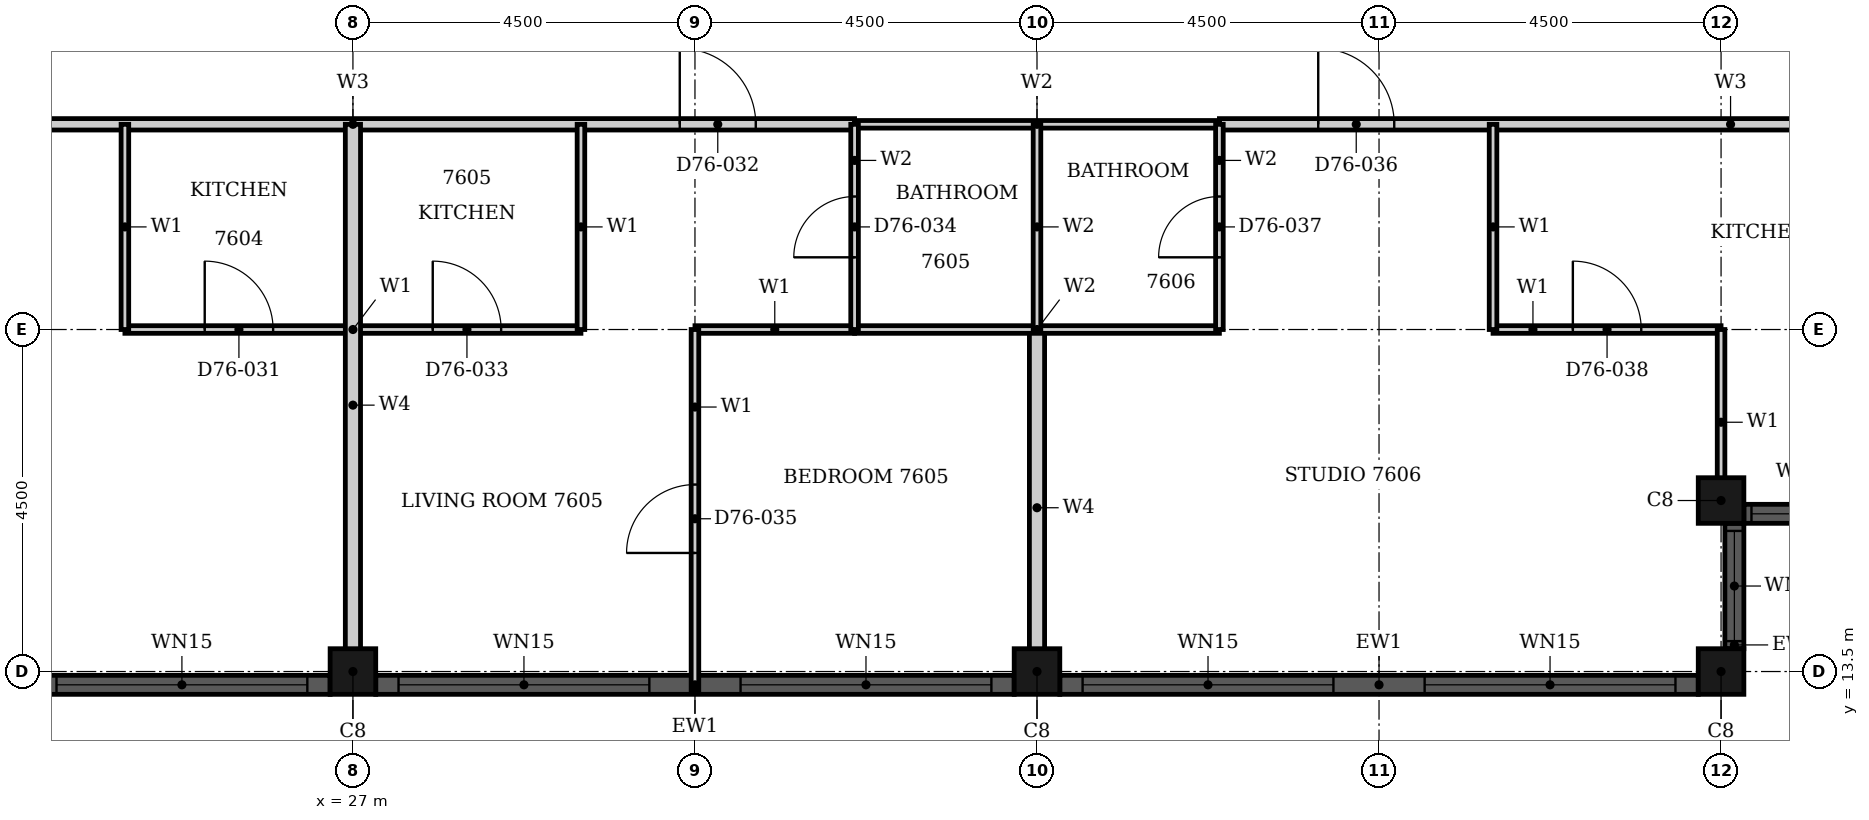
"""IFC4 building model, lengths in metres.
Left out: names, types, materials, properties, quantities, classifications, styles, units other than length and angle.
Written with IfcOpenShell. Run it as: python <this file> out.ifc"""

import sys

from ifc_helpers import new_model, si_unit, direction, frame, frame_2d, origin, origin_2d, place, context, subcontext, project, spatial, rectangle, hollow_rectangle, extrude, element, fill, save


model = new_model("IFC4")
c1 = context("Model", 3, precision=1e-05, world=origin(), true_north=direction((0.0, 1.0)))
c2 = subcontext(c1, "Body", "Model", "MODEL_VIEW")
j1 = project(units=[si_unit("LENGTHUNIT", "METRE"), si_unit("PLANEANGLEUNIT", "RADIAN")], contexts=[c1])
p1 = place(None, origin())
s1 = spatial("IfcSite", under=j1, at=p1, CompositionType="ELEMENT")
p2 = place(p1, origin())
s2 = spatial("IfcBuilding", under=s1, at=p2, CompositionType="ELEMENT")
p3 = place(p2, frame((0.0, 0.0, 298.2)))
s3 = spatial("IfcBuildingStorey", under=s2, at=p3, CompositionType="ELEMENT", Elevation=298.2)
for number, where, z_axis, x_axis in (
    (1, (45.0, 13.5, 0.0), (0.0, 0.0, 1.0), (1.0, 0.0, 0.0)),
    (2, (45.0, 15.75, 0.0), (0.0, 0.0, 1.0), (1.0, 0.0, 0.0)),
    (3, (27.0, 13.5, 0.0), (0.0, 0.0, 1.0), (1.0, 0.0, 0.0)),
    (4, (36.0, 13.5, 0.0), (0.0, 0.0, 1.0), (1.0, 0.0, 0.0)),
):
    element("IfcColumn", number, at=place(p3, frame(where, z_axis=z_axis, x_axis=x_axis)), inside=s3, PredefinedType="COLUMN", context=c2, shape_type="SweptSolid", body=[
        extrude(hollow_rectangle(XDim=0.6, YDim=0.6, WallThickness=0.02, at=origin_2d()), origin(), (0.0, 0.0, 1.0), 3.7),
    ])
p4 = place(p3, frame((45.175, 13.8, 0.0), z_axis=(0.0, 0.0, 1.0), x_axis=(0.0, 1.0, 0.0)))
e5 = element("IfcWall", 5, at=p4, inside=s3, PredefinedType="SOLIDWALL", context=c2, shape_type="SweptSolid", body=[
    extrude(rectangle(XDim=1.65, YDim=0.25, at=frame_2d((0.825, 0.0))), origin(), (0.0, 0.0, 1.0), 3.7),
])
p5 = place(p4, frame((0.1, 0.0, 0.9)))
e6 = element("IfcOpeningElement", 6, at=p5, cuts=e5, PredefinedType="OPENING", context=c2, shape_type="SweptSolid", body=[
    extrude(rectangle(XDim=1.45, YDim=1.85, at=frame_2d((0.725, 0.925))), frame((0.0, 0.135, 0.0), z_axis=(0.0, -1.0, 0.0), x_axis=(1.0, 0.0, 0.0)), (0.0, 0.0, 1.0), 0.27),
])
p6 = place(p3, frame((45.3, 15.575, 0.0), z_axis=(0.0, 0.0, 1.0), x_axis=(1.0, 0.0, 0.0)))
e7 = element("IfcWall", 7, at=p6, inside=s3, PredefinedType="SOLIDWALL", context=c2, shape_type="SweptSolid", body=[
    extrude(rectangle(XDim=1.65, YDim=0.25, at=frame_2d((0.825, 0.0))), origin(), (0.0, 0.0, 1.0), 3.7),
])
p7 = place(p6, frame((0.1, 0.0, 0.9)))
e8 = element("IfcOpeningElement", 8, at=p7, cuts=e7, PredefinedType="OPENING", context=c2, shape_type="SweptSolid", body=[
    extrude(rectangle(XDim=1.45, YDim=1.85, at=frame_2d((0.725, 0.925))), frame((0.0, 0.135, 0.0), z_axis=(0.0, -1.0, 0.0), x_axis=(1.0, 0.0, 0.0)), (0.0, 0.0, 1.0), 0.27),
])
p8 = place(p3, frame((18.3, 13.325, 0.0), z_axis=(0.0, 0.0, 1.0), x_axis=(1.0, 0.0, 0.0)))
e9 = element("IfcWall", 9, at=p8, inside=s3, PredefinedType="SOLIDWALL", context=c2, shape_type="SweptSolid", body=[
    extrude(rectangle(XDim=8.4, YDim=0.25, at=frame_2d((4.2, 0.0))), origin(), (0.0, 0.0, 1.0), 3.7),
])
p9 = place(p8, frame((0.3, 0.0, 0.45)))
e10 = element("IfcOpeningElement", 10, at=p9, cuts=e9, PredefinedType="OPENING", context=c2, shape_type="SweptSolid", body=[
    extrude(rectangle(XDim=3.3, YDim=2.3, at=frame_2d((1.65, 1.15))), frame((0.0, 0.135, 0.0), z_axis=(0.0, -1.0, 0.0), x_axis=(1.0, 0.0, 0.0)), (0.0, 0.0, 1.0), 0.27),
])
p10 = place(p8, frame((4.8, 0.0, 0.45)))
e11 = element("IfcOpeningElement", 11, at=p10, cuts=e9, PredefinedType="OPENING", context=c2, shape_type="SweptSolid", body=[
    extrude(rectangle(XDim=3.3, YDim=2.3, at=frame_2d((1.65, 1.15))), frame((0.0, 0.135, 0.0), z_axis=(0.0, -1.0, 0.0), x_axis=(1.0, 0.0, 0.0)), (0.0, 0.0, 1.0), 0.27),
])
p11 = place(p3, frame((27.3, 13.325, 0.0), z_axis=(0.0, 0.0, 1.0), x_axis=(1.0, 0.0, 0.0)))
e12 = element("IfcWall", 12, at=p11, inside=s3, PredefinedType="SOLIDWALL", context=c2, shape_type="SweptSolid", body=[
    extrude(rectangle(XDim=8.4, YDim=0.25, at=frame_2d((4.2, 0.0))), origin(), (0.0, 0.0, 1.0), 3.7),
])
p12 = place(p11, frame((0.3, 0.0, 0.45)))
e13 = element("IfcOpeningElement", 13, at=p12, cuts=e12, PredefinedType="OPENING", context=c2, shape_type="SweptSolid", body=[
    extrude(rectangle(XDim=3.3, YDim=2.3, at=frame_2d((1.65, 1.15))), frame((0.0, 0.135, 0.0), z_axis=(0.0, -1.0, 0.0), x_axis=(1.0, 0.0, 0.0)), (0.0, 0.0, 1.0), 0.27),
])
p13 = place(p11, frame((4.8, 0.0, 0.45)))
e14 = element("IfcOpeningElement", 14, at=p13, cuts=e12, PredefinedType="OPENING", context=c2, shape_type="SweptSolid", body=[
    extrude(rectangle(XDim=3.3, YDim=2.3, at=frame_2d((1.65, 1.15))), frame((0.0, 0.135, 0.0), z_axis=(0.0, -1.0, 0.0), x_axis=(1.0, 0.0, 0.0)), (0.0, 0.0, 1.0), 0.27),
])
p14 = place(p3, frame((36.3, 13.325, 0.0), z_axis=(0.0, 0.0, 1.0), x_axis=(1.0, 0.0, 0.0)))
e15 = element("IfcWall", 15, at=p14, inside=s3, PredefinedType="SOLIDWALL", context=c2, shape_type="SweptSolid", body=[
    extrude(rectangle(XDim=8.4, YDim=0.25, at=frame_2d((4.2, 0.0))), origin(), (0.0, 0.0, 1.0), 3.7),
])
p15 = place(p14, frame((0.3, 0.0, 0.45)))
e16 = element("IfcOpeningElement", 16, at=p15, cuts=e15, PredefinedType="OPENING", context=c2, shape_type="SweptSolid", body=[
    extrude(rectangle(XDim=3.3, YDim=2.3, at=frame_2d((1.65, 1.15))), frame((0.0, 0.135, 0.0), z_axis=(0.0, -1.0, 0.0), x_axis=(1.0, 0.0, 0.0)), (0.0, 0.0, 1.0), 0.27),
])
p16 = place(p14, frame((4.8, 0.0, 0.45)))
e17 = element("IfcOpeningElement", 17, at=p16, cuts=e15, PredefinedType="OPENING", context=c2, shape_type="SweptSolid", body=[
    extrude(rectangle(XDim=3.3, YDim=2.3, at=frame_2d((1.65, 1.15))), frame((0.0, 0.135, 0.0), z_axis=(0.0, -1.0, 0.0), x_axis=(1.0, 0.0, 0.0)), (0.0, 0.0, 1.0), 0.27),
])
p17 = place(p3, frame((20.4, 20.7, 0.0), z_axis=(0.0, 0.0, 1.0), x_axis=(1.0, 0.0, 0.0)))
e18 = element("IfcWall", 18, at=p17, inside=s3, PredefinedType="PARTITIONING", context=c2, shape_type="SweptSolid", body=[
    extrude(rectangle(XDim=13.2, YDim=0.15, at=frame_2d((6.6, 0.0))), origin(), (0.0, 0.0, 1.0), 3.4),
])
p18 = place(p17, frame((1.3, 0.0, 0.0)))
e19 = element("IfcOpeningElement", 19, at=p18, cuts=e18, PredefinedType="OPENING", context=c2, shape_type="SweptSolid", body=[
    extrude(rectangle(XDim=1.0, YDim=2.2, at=frame_2d((0.5, 1.1))), frame((0.0, 0.085, 0.0), z_axis=(0.0, -1.0, 0.0), x_axis=(1.0, 0.0, 0.0)), (0.0, 0.0, 1.0), 0.17),
])
p19 = place(p17, frame((10.9, 0.0, 0.0)))
e20 = element("IfcOpeningElement", 20, at=p19, cuts=e18, PredefinedType="OPENING", context=c2, shape_type="SweptSolid", body=[
    extrude(rectangle(XDim=1.0, YDim=2.2, at=frame_2d((0.5, 1.1))), frame((0.0, 0.085, 0.0), z_axis=(0.0, -1.0, 0.0), x_axis=(1.0, 0.0, 0.0)), (0.0, 0.0, 1.0), 0.17),
])
p20 = place(p3, frame((38.4, 20.7, 0.0), z_axis=(0.0, 0.0, 1.0), x_axis=(1.0, 0.0, 0.0)))
e21 = element("IfcWall", 21, at=p20, inside=s3, PredefinedType="PARTITIONING", context=c2, shape_type="SweptSolid", body=[
    extrude(rectangle(XDim=11.15, YDim=0.15, at=frame_2d((5.575, 0.0))), origin(), (0.0, 0.0, 1.0), 3.4),
])
p21 = place(p20, frame((1.3, 0.0, 0.0)))
e22 = element("IfcOpeningElement", 22, at=p21, cuts=e21, PredefinedType="OPENING", context=c2, shape_type="SweptSolid", body=[
    extrude(rectangle(XDim=1.0, YDim=2.2, at=frame_2d((0.5, 1.1))), frame((0.0, 0.085, 0.0), z_axis=(0.0, -1.0, 0.0), x_axis=(1.0, 0.0, 0.0)), (0.0, 0.0, 1.0), 0.17),
])
p22 = place(p3, frame((24.0, 18.0, 0.0), z_axis=(0.0, 0.0, 1.0), x_axis=(1.0, 0.0, 0.0)))
e23 = element("IfcWall", 23, at=p22, inside=s3, PredefinedType="PARTITIONING", context=c2, shape_type="SweptSolid", body=[
    extrude(rectangle(XDim=6.0, YDim=0.1, at=frame_2d((3.0, 0.0))), origin(), (0.0, 0.0, 1.0), 3.4),
])
p23 = place(p22, frame((1.05, 0.0, 0.0)))
e24 = element("IfcOpeningElement", 24, at=p23, cuts=e23, PredefinedType="OPENING", context=c2, shape_type="SweptSolid", body=[
    extrude(rectangle(XDim=0.9, YDim=2.1, at=frame_2d((0.45, 1.05))), frame((0.0, 0.06, 0.0), z_axis=(0.0, -1.0, 0.0), x_axis=(1.0, 0.0, 0.0)), (0.0, 0.0, 1.0), 0.12),
])
p24 = place(p22, frame((4.05, 0.0, 0.0)))
e25 = element("IfcOpeningElement", 25, at=p24, cuts=e23, PredefinedType="OPENING", context=c2, shape_type="SweptSolid", body=[
    extrude(rectangle(XDim=0.9, YDim=2.1, at=frame_2d((0.45, 1.05))), frame((0.0, 0.06, 0.0), z_axis=(0.0, -1.0, 0.0), x_axis=(1.0, 0.0, 0.0)), (0.0, 0.0, 1.0), 0.12),
])
p25 = place(p3, frame((31.5, 18.0, 0.0), z_axis=(0.0, 0.0, 1.0), x_axis=(1.0, 0.0, 0.0)))
e26 = element("IfcWall", 26, at=p25, inside=s3, PredefinedType="PARTITIONING", context=c2, shape_type="SweptSolid", body=[
    extrude(rectangle(XDim=2.1, YDim=0.1, at=frame_2d((1.05, 0.0))), origin(), (0.0, 0.0, 1.0), 3.4),
])
p26 = place(p3, frame((42.0, 18.0, 0.0), z_axis=(0.0, 0.0, 1.0), x_axis=(1.0, 0.0, 0.0)))
e27 = element("IfcWall", 27, at=p26, inside=s3, PredefinedType="PARTITIONING", context=c2, shape_type="SweptSolid", body=[
    extrude(rectangle(XDim=3.0, YDim=0.1, at=frame_2d((1.5, 0.0))), origin(), (0.0, 0.0, 1.0), 3.4),
])
p27 = place(p26, frame((1.05, 0.0, 0.0)))
e28 = element("IfcOpeningElement", 28, at=p27, cuts=e27, PredefinedType="OPENING", context=c2, shape_type="SweptSolid", body=[
    extrude(rectangle(XDim=0.9, YDim=2.1, at=frame_2d((0.45, 1.05))), frame((0.0, 0.06, 0.0), z_axis=(0.0, -1.0, 0.0), x_axis=(1.0, 0.0, 0.0)), (0.0, 0.0, 1.0), 0.12),
])
for number, where, z_axis, x_axis in (
    (29, (24.0, 18.0, 0.0), (0.0, 0.0, 1.0), (0.0, 1.0, 0.0)),
    (30, (30.0, 18.0, 0.0), (0.0, 0.0, 1.0), (0.0, 1.0, 0.0)),
):
    element("IfcWall", number, at=place(p3, frame(where, z_axis=z_axis, x_axis=x_axis)), inside=s3, PredefinedType="PARTITIONING", context=c2, shape_type="SweptSolid", body=[
        extrude(rectangle(XDim=2.7, YDim=0.1, at=frame_2d((1.35, 0.0))), origin(), (0.0, 0.0, 1.0), 3.4),
    ])
p28 = place(p3, frame((31.5, 13.26, 0.0), z_axis=(0.0, 0.0, 1.0), x_axis=(0.0, 1.0, 0.0)))
e31 = element("IfcWall", 31, at=p28, inside=s3, PredefinedType="PARTITIONING", context=c2, shape_type="SweptSolid", body=[
    extrude(rectangle(XDim=4.74, YDim=0.1, at=frame_2d((2.37, 0.0))), origin(), (0.0, 0.0, 1.0), 3.4),
])
p29 = place(p28, frame((1.8, 0.0, 0.0)))
e32 = element("IfcOpeningElement", 32, at=p29, cuts=e31, PredefinedType="OPENING", context=c2, shape_type="SweptSolid", body=[
    extrude(rectangle(XDim=0.9, YDim=2.1, at=frame_2d((0.45, 1.05))), frame((0.0, 0.06, 0.0), z_axis=(0.0, -1.0, 0.0), x_axis=(1.0, 0.0, 0.0)), (0.0, 0.0, 1.0), 0.12),
])
p30 = place(p3, frame((42.0, 18.0, 0.0), z_axis=(0.0, 0.0, 1.0), x_axis=(0.0, 1.0, 0.0)))
e33 = element("IfcWall", 33, at=p30, inside=s3, PredefinedType="PARTITIONING", context=c2, shape_type="SweptSolid", body=[
    extrude(rectangle(XDim=2.7, YDim=0.1, at=frame_2d((1.35, 0.0))), origin(), (0.0, 0.0, 1.0), 3.4),
])
p31 = place(p3, frame((45.0, 15.56, 0.0), z_axis=(0.0, 0.0, 1.0), x_axis=(0.0, 1.0, 0.0)))
e34 = element("IfcWall", 34, at=p31, inside=s3, PredefinedType="PARTITIONING", context=c2, shape_type="SweptSolid", body=[
    extrude(rectangle(XDim=2.44, YDim=0.1, at=frame_2d((1.22, 0.0))), origin(), (0.0, 0.0, 1.0), 3.4),
])
p32 = place(p3, frame((27.0, 13.31, 0.0), z_axis=(0.0, 0.0, 1.0), x_axis=(0.0, 1.0, 0.0)))
e35 = element("IfcWall", 35, at=p32, inside=s3, PredefinedType="PARTITIONING", context=c2, shape_type="SweptSolid", body=[
    extrude(rectangle(XDim=7.39, YDim=0.2, at=frame_2d((3.695, 0.0))), origin(), (0.0, 0.0, 1.0), 3.4),
])
p33 = place(p3, frame((36.0, 13.31, 0.0), z_axis=(0.0, 0.0, 1.0), x_axis=(0.0, 1.0, 0.0)))
e36 = element("IfcWall", 36, at=p33, inside=s3, PredefinedType="PARTITIONING", context=c2, shape_type="SweptSolid", body=[
    extrude(rectangle(XDim=4.69, YDim=0.2, at=frame_2d((2.345, 0.0))), origin(), (0.0, 0.0, 1.0), 3.4),
])
for number, where, z_axis, x_axis in (
    (37, (33.6, 18.0, 0.0), (0.0, 0.0, 1.0), (1.0, 0.0, 0.0)),
    (38, (33.6, 20.7, 0.0), (0.0, 0.0, 1.0), (1.0, 0.0, 0.0)),
):
    element("IfcWall", number, at=place(p3, frame(where, z_axis=z_axis, x_axis=x_axis)), inside=s3, PredefinedType="PARTITIONING", context=c2, shape_type="SweptSolid", body=[
        extrude(rectangle(XDim=4.8, YDim=0.1, at=frame_2d((2.4, 0.0))), origin(), (0.0, 0.0, 1.0), 3.4),
    ])
p34 = place(p3, frame((33.6, 18.0, 0.0), z_axis=(0.0, 0.0, 1.0), x_axis=(0.0, 1.0, 0.0)))
e39 = element("IfcWall", 39, at=p34, inside=s3, PredefinedType="PARTITIONING", context=c2, shape_type="SweptSolid", body=[
    extrude(rectangle(XDim=2.7, YDim=0.1, at=frame_2d((1.35, 0.0))), origin(), (0.0, 0.0, 1.0), 3.4),
])
p35 = place(p34, frame((0.95, 0.0, 0.0)))
e40 = element("IfcOpeningElement", 40, at=p35, cuts=e39, PredefinedType="OPENING", context=c2, shape_type="SweptSolid", body=[
    extrude(rectangle(XDim=0.8, YDim=2.1, at=frame_2d((0.4, 1.05))), frame((0.0, 0.06, 0.0), z_axis=(0.0, -1.0, 0.0), x_axis=(1.0, 0.0, 0.0)), (0.0, 0.0, 1.0), 0.12),
])
p36 = place(p3, frame((36.0, 18.0, 0.0), z_axis=(0.0, 0.0, 1.0), x_axis=(0.0, 1.0, 0.0)))
e41 = element("IfcWall", 41, at=p36, inside=s3, PredefinedType="PARTITIONING", context=c2, shape_type="SweptSolid", body=[
    extrude(rectangle(XDim=2.7, YDim=0.1, at=frame_2d((1.35, 0.0))), origin(), (0.0, 0.0, 1.0), 3.4),
])
p37 = place(p3, frame((38.4, 18.0, 0.0), z_axis=(0.0, 0.0, 1.0), x_axis=(0.0, 1.0, 0.0)))
e42 = element("IfcWall", 42, at=p37, inside=s3, PredefinedType="PARTITIONING", context=c2, shape_type="SweptSolid", body=[
    extrude(rectangle(XDim=2.7, YDim=0.1, at=frame_2d((1.35, 0.0))), origin(), (0.0, 0.0, 1.0), 3.4),
])
p38 = place(p37, frame((0.95, 0.0, 0.0)))
e43 = element("IfcOpeningElement", 43, at=p38, cuts=e42, PredefinedType="OPENING", context=c2, shape_type="SweptSolid", body=[
    extrude(rectangle(XDim=0.8, YDim=2.1, at=frame_2d((0.4, 1.05))), frame((0.0, 0.06, 0.0), z_axis=(0.0, -1.0, 0.0), x_axis=(1.0, 0.0, 0.0)), (0.0, 0.0, 1.0), 0.12),
])
p39 = place(p5, origin())
e44 = element("IfcWindow", 44, at=p39, inside=s3, PartitioningType="SINGLE_PANEL", PredefinedType="WINDOW", context=c2, shape_type="SweptSolid", body=[
    extrude(rectangle(XDim=1.45, YDim=1.85, at=frame_2d((0.725, 0.925))), frame((0.0, 0.03, 0.0), z_axis=(0.0, -1.0, 0.0), x_axis=(1.0, 0.0, 0.0)), (0.0, 0.0, 1.0), 0.06),
])
fill(e6, e44)
p40 = place(p7, origin())
e45 = element("IfcWindow", 45, at=p40, inside=s3, PartitioningType="SINGLE_PANEL", PredefinedType="WINDOW", context=c2, shape_type="SweptSolid", body=[
    extrude(rectangle(XDim=1.45, YDim=1.85, at=frame_2d((0.725, 0.925))), frame((0.0, 0.03, 0.0), z_axis=(0.0, -1.0, 0.0), x_axis=(1.0, 0.0, 0.0)), (0.0, 0.0, 1.0), 0.06),
])
fill(e8, e45)
p41 = place(p10, origin())
e46 = element("IfcWindow", 46, at=p41, inside=s3, PartitioningType="SINGLE_PANEL", PredefinedType="WINDOW", context=c2, shape_type="SweptSolid", body=[
    extrude(rectangle(XDim=3.3, YDim=2.3, at=frame_2d((1.65, 1.15))), frame((0.0, 0.03, 0.0), z_axis=(0.0, -1.0, 0.0), x_axis=(1.0, 0.0, 0.0)), (0.0, 0.0, 1.0), 0.06),
])
fill(e11, e46)
p42 = place(p12, origin())
e47 = element("IfcWindow", 47, at=p42, inside=s3, PartitioningType="SINGLE_PANEL", PredefinedType="WINDOW", context=c2, shape_type="SweptSolid", body=[
    extrude(rectangle(XDim=3.3, YDim=2.3, at=frame_2d((1.65, 1.15))), frame((0.0, 0.03, 0.0), z_axis=(0.0, -1.0, 0.0), x_axis=(1.0, 0.0, 0.0)), (0.0, 0.0, 1.0), 0.06),
])
fill(e13, e47)
p43 = place(p13, origin())
e48 = element("IfcWindow", 48, at=p43, inside=s3, PartitioningType="SINGLE_PANEL", PredefinedType="WINDOW", context=c2, shape_type="SweptSolid", body=[
    extrude(rectangle(XDim=3.3, YDim=2.3, at=frame_2d((1.65, 1.15))), frame((0.0, 0.03, 0.0), z_axis=(0.0, -1.0, 0.0), x_axis=(1.0, 0.0, 0.0)), (0.0, 0.0, 1.0), 0.06),
])
fill(e14, e48)
p44 = place(p15, origin())
e49 = element("IfcWindow", 49, at=p44, inside=s3, PartitioningType="SINGLE_PANEL", PredefinedType="WINDOW", context=c2, shape_type="SweptSolid", body=[
    extrude(rectangle(XDim=3.3, YDim=2.3, at=frame_2d((1.65, 1.15))), frame((0.0, 0.03, 0.0), z_axis=(0.0, -1.0, 0.0), x_axis=(1.0, 0.0, 0.0)), (0.0, 0.0, 1.0), 0.06),
])
fill(e16, e49)
p45 = place(p16, origin())
e50 = element("IfcWindow", 50, at=p45, inside=s3, PartitioningType="SINGLE_PANEL", PredefinedType="WINDOW", context=c2, shape_type="SweptSolid", body=[
    extrude(rectangle(XDim=3.3, YDim=2.3, at=frame_2d((1.65, 1.15))), frame((0.0, 0.03, 0.0), z_axis=(0.0, -1.0, 0.0), x_axis=(1.0, 0.0, 0.0)), (0.0, 0.0, 1.0), 0.06),
])
fill(e17, e50)
p46 = place(p23, origin())
e51 = element("IfcDoor", 51, at=p46, inside=s3, OperationType="SINGLE_SWING_RIGHT", PredefinedType="DOOR", context=c2, shape_type="SweptSolid", body=[
    extrude(rectangle(XDim=0.9, YDim=2.1, at=frame_2d((0.45, 1.05))), frame((0.0, 0.025, 0.0), z_axis=(0.0, -1.0, 0.0), x_axis=(1.0, 0.0, 0.0)), (0.0, 0.0, 1.0), 0.05),
])
fill(e24, e51)
p47 = place(p19, origin())
e52 = element("IfcDoor", 52, at=p47, inside=s3, OperationType="SINGLE_SWING_LEFT", PredefinedType="DOOR", context=c2, shape_type="SweptSolid", body=[
    extrude(rectangle(XDim=1.0, YDim=2.2, at=frame_2d((0.5, 1.1))), frame((0.0, 0.025, 0.0), z_axis=(0.0, -1.0, 0.0), x_axis=(1.0, 0.0, 0.0)), (0.0, 0.0, 1.0), 0.05),
])
fill(e20, e52)
p48 = place(p24, origin())
e53 = element("IfcDoor", 53, at=p48, inside=s3, OperationType="SINGLE_SWING_RIGHT", PredefinedType="DOOR", context=c2, shape_type="SweptSolid", body=[
    extrude(rectangle(XDim=0.9, YDim=2.1, at=frame_2d((0.45, 1.05))), frame((0.0, 0.025, 0.0), z_axis=(0.0, -1.0, 0.0), x_axis=(1.0, 0.0, 0.0)), (0.0, 0.0, 1.0), 0.05),
])
fill(e25, e53)
p49 = place(p35, origin())
e54 = element("IfcDoor", 54, at=p49, inside=s3, OperationType="SINGLE_SWING_LEFT", PredefinedType="DOOR", context=c2, shape_type="SweptSolid", body=[
    extrude(rectangle(XDim=0.8, YDim=2.1, at=frame_2d((0.4, 1.05))), frame((0.0, 0.025, 0.0), z_axis=(0.0, -1.0, 0.0), x_axis=(1.0, 0.0, 0.0)), (0.0, 0.0, 1.0), 0.05),
])
fill(e40, e54)
p50 = place(p29, origin())
e55 = element("IfcDoor", 55, at=p50, inside=s3, OperationType="SINGLE_SWING_RIGHT", PredefinedType="DOOR", context=c2, shape_type="SweptSolid", body=[
    extrude(rectangle(XDim=0.9, YDim=2.1, at=frame_2d((0.45, 1.05))), frame((0.0, 0.025, 0.0), z_axis=(0.0, -1.0, 0.0), x_axis=(1.0, 0.0, 0.0)), (0.0, 0.0, 1.0), 0.05),
])
fill(e32, e55)
p51 = place(p21, origin())
e56 = element("IfcDoor", 56, at=p51, inside=s3, OperationType="SINGLE_SWING_LEFT", PredefinedType="DOOR", context=c2, shape_type="SweptSolid", body=[
    extrude(rectangle(XDim=1.0, YDim=2.2, at=frame_2d((0.5, 1.1))), frame((0.0, 0.025, 0.0), z_axis=(0.0, -1.0, 0.0), x_axis=(1.0, 0.0, 0.0)), (0.0, 0.0, 1.0), 0.05),
])
fill(e22, e56)
p52 = place(p38, origin())
e57 = element("IfcDoor", 57, at=p52, inside=s3, OperationType="SINGLE_SWING_LEFT", PredefinedType="DOOR", context=c2, shape_type="SweptSolid", body=[
    extrude(rectangle(XDim=0.8, YDim=2.1, at=frame_2d((0.4, 1.05))), frame((0.0, 0.025, 0.0), z_axis=(0.0, -1.0, 0.0), x_axis=(1.0, 0.0, 0.0)), (0.0, 0.0, 1.0), 0.05),
])
fill(e43, e57)
p53 = place(p27, origin())
e58 = element("IfcDoor", 58, at=p53, inside=s3, OperationType="SINGLE_SWING_RIGHT", PredefinedType="DOOR", context=c2, shape_type="SweptSolid", body=[
    extrude(rectangle(XDim=0.9, YDim=2.1, at=frame_2d((0.45, 1.05))), frame((0.0, 0.025, 0.0), z_axis=(0.0, -1.0, 0.0), x_axis=(1.0, 0.0, 0.0)), (0.0, 0.0, 1.0), 0.05),
])
fill(e28, e58)
save(model, sys.argv[1])
